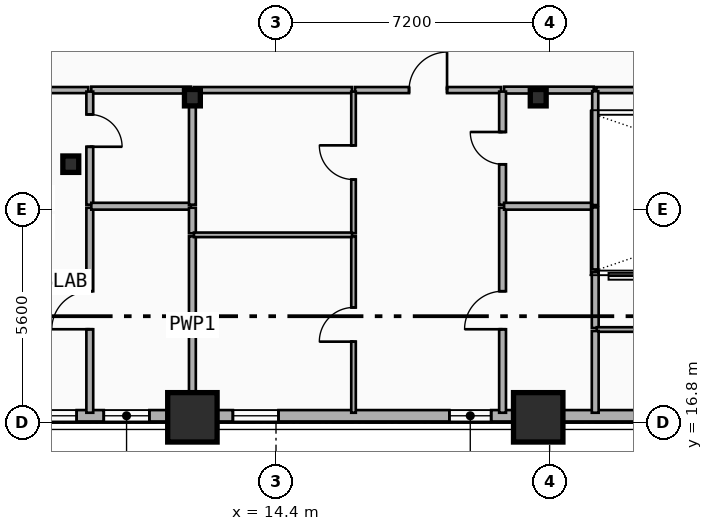
"""IFC4 building model, lengths in metres.
Left out: names, types, materials, properties, quantities, classifications, styles, units other than length and angle.
Written with IfcOpenShell. Run it as: python <this file> out.ifc"""

import sys

from ifc_helpers import new_model, si_unit, direction, frame, frame_2d, origin, origin_2d, place, context, subcontext, project, spatial, rectangle, i_section, extrude, element, fill, save


model = new_model("IFC4")
c1 = context("Model", 3, precision=1e-05, world=origin(), true_north=direction((0.0, 1.0)))
c2 = subcontext(c1, "Body", "Model", "MODEL_VIEW")
j1 = project(units=[si_unit("LENGTHUNIT", "METRE"), si_unit("PLANEANGLEUNIT", "RADIAN")], contexts=[c1])
p1 = place(None, origin())
s1 = spatial("IfcSite", under=j1, at=p1, CompositionType="ELEMENT")
p2 = place(p1, origin())
s2 = spatial("IfcBuilding", under=s1, at=p2, CompositionType="ELEMENT")
p3 = place(p2, frame((0.0, 0.0, 101.3)))
s3 = spatial("IfcBuildingStorey", under=s2, at=p3, CompositionType="ELEMENT", Elevation=101.3)
for number, where, z_axis, x_axis in (
    (1, (12.2, 25.35, 0.0), (0.0, 0.0, 1.0), (1.0, 0.0, 0.0)),
    (2, (21.3, 25.35, 0.0), (0.0, 0.0, 1.0), (1.0, 0.0, 0.0)),
):
    element("IfcColumn", number, at=place(p3, frame(where, z_axis=z_axis, x_axis=x_axis)), inside=s3, PredefinedType="COLUMN", context=c2, shape_type="SweptSolid", body=[
        extrude(i_section(OverallWidth=0.418, OverallDepth=0.432, WebThickness=0.035, FlangeThickness=0.056, FilletRadius=0.015, at=origin_2d()), origin(), (0.0, 0.0, 1.0), 3.5),
    ])
for number, where, z_axis, x_axis in (
    (3, (12.2, 17.048, 0.0), (0.0, -0.09, 0.996), (1.0, 0.0, 0.0)),
    (4, (21.3, 17.048, 0.0), (0.0, -0.09, 0.996), (1.0, 0.0, 0.0)),
):
    element("IfcColumn", number, at=place(p3, frame(where, z_axis=z_axis, x_axis=x_axis)), inside=s3, PredefinedType="COLUMN", context=c2, shape_type="SweptSolid", body=[
        extrude(rectangle(XDim=1.3, YDim=1.3, at=origin_2d()), origin(), (0.0, 0.0, 1.0), 3.514),
    ])
p4 = place(p3, frame((9.0, 23.6, 0.0), z_axis=(0.0, 0.0, 1.0), x_axis=(1.0, 0.0, 0.0)))
e5 = element("IfcColumn", 5, at=p4, inside=s3, PredefinedType="COLUMN", context=c2, shape_type="SweptSolid", body=[
    extrude(i_section(OverallWidth=0.418, OverallDepth=0.432, WebThickness=0.035, FlangeThickness=0.056, FilletRadius=0.015, at=origin_2d()), origin(), (0.0, 0.0, 1.0), 3.5),
])
p5 = place(p3, frame((53.4, 16.98, 0.0), z_axis=(0.0, 0.0, 1.0), x_axis=(-1.0, 0.0, 0.0)))
e6 = element("IfcWall", 6, at=p5, inside=s3, PredefinedType="SOLIDWALL", context=c2, shape_type="SweptSolid", body=[
    extrude(rectangle(XDim=49.2, YDim=0.3, at=frame_2d((24.6, 0.0))), origin(), (0.0, 0.0, 1.0), 2.86),
])
p6 = place(p5, frame((44.246, 0.0, 0.48)))
e7 = element("IfcOpeningElement", 7, at=p6, cuts=e6, PredefinedType="OPENING", context=c2, shape_type="SweptSolid", body=[
    extrude(rectangle(XDim=1.6, YDim=1.95, at=frame_2d((0.8, 0.975))), frame((0.0, 0.16, 0.0), z_axis=(0.0, -1.0, 0.0), x_axis=(1.0, 0.0, 0.0)), (0.0, 0.0, 1.0), 0.32),
])
p7 = place(p5, frame((42.333, 0.0, 0.68)))
e8 = element("IfcOpeningElement", 8, at=p7, cuts=e6, PredefinedType="OPENING", context=c2, shape_type="SweptSolid", body=[
    extrude(rectangle(XDim=1.2, YDim=1.5, at=frame_2d((0.6, 0.75))), frame((0.0, 0.16, 0.0), z_axis=(0.0, -1.0, 0.0), x_axis=(1.0, 0.0, 0.0)), (0.0, 0.0, 1.0), 0.32),
])
p8 = place(p5, frame((33.338, 0.0, 1.48)))
e9 = element("IfcOpeningElement", 9, at=p8, cuts=e6, PredefinedType="OPENING", context=c2, shape_type="SweptSolid", body=[
    extrude(rectangle(XDim=1.1, YDim=1.05, at=frame_2d((0.55, 0.525))), frame((0.0, 0.16, 0.0), z_axis=(0.0, -1.0, 0.0), x_axis=(1.0, 0.0, 0.0)), (0.0, 0.0, 1.0), 0.32),
])
p9 = place(p5, frame((38.935, 0.0, 0.48)))
e10 = element("IfcOpeningElement", 10, at=p9, cuts=e6, PredefinedType="OPENING", context=c2, shape_type="SweptSolid", body=[
    extrude(rectangle(XDim=1.2, YDim=1.5, at=frame_2d((0.6, 0.75))), frame((0.0, 0.16, 0.0), z_axis=(0.0, -1.0, 0.0), x_axis=(1.0, 0.0, 0.0)), (0.0, 0.0, 1.0), 0.32),
])
p10 = place(p5, frame((20.025, 0.0, 0.73)))
e11 = element("IfcOpeningElement", 11, at=p10, cuts=e6, PredefinedType="OPENING", context=c2, shape_type="SweptSolid", body=[
    extrude(rectangle(XDim=1.6, YDim=1.95, at=frame_2d((0.8, 0.975))), frame((0.0, 0.16, 0.0), z_axis=(0.0, -1.0, 0.0), x_axis=(1.0, 0.0, 0.0)), (0.0, 0.0, 1.0), 0.32),
])
p11 = place(p5, frame((13.65, 0.0, 0.52)))
e12 = element("IfcOpeningElement", 12, at=p11, cuts=e6, PredefinedType="OPENING", context=c2, shape_type="SweptSolid", body=[
    extrude(rectangle(XDim=1.1, YDim=1.05, at=frame_2d((0.55, 0.525))), frame((0.0, 0.16, 0.0), z_axis=(0.0, -1.0, 0.0), x_axis=(1.0, 0.0, 0.0)), (0.0, 0.0, 1.0), 0.32),
])
p12 = place(p5, frame((9.701, 0.0, 1.48)))
e13 = element("IfcOpeningElement", 13, at=p12, cuts=e6, PredefinedType="OPENING", context=c2, shape_type="SweptSolid", body=[
    extrude(rectangle(XDim=1.1, YDim=1.05, at=frame_2d((0.55, 0.525))), frame((0.0, 0.16, 0.0), z_axis=(0.0, -1.0, 0.0), x_axis=(1.0, 0.0, 0.0)), (0.0, 0.0, 1.0), 0.32),
])
p13 = place(p5, frame((3.354, 0.0, 0.48)))
e14 = element("IfcOpeningElement", 14, at=p13, cuts=e6, PredefinedType="OPENING", context=c2, shape_type="SweptSolid", body=[
    extrude(rectangle(XDim=1.6, YDim=1.95, at=frame_2d((0.8, 0.975))), frame((0.0, 0.16, 0.0), z_axis=(0.0, -1.0, 0.0), x_axis=(1.0, 0.0, 0.0)), (0.0, 0.0, 1.0), 0.32),
])
p14 = place(p5, frame((5.667, 0.0, 0.68)))
e15 = element("IfcOpeningElement", 15, at=p14, cuts=e6, PredefinedType="OPENING", context=c2, shape_type="SweptSolid", body=[
    extrude(rectangle(XDim=1.2, YDim=1.5, at=frame_2d((0.6, 0.75))), frame((0.0, 0.16, 0.0), z_axis=(0.0, -1.0, 0.0), x_axis=(1.0, 0.0, 0.0)), (0.0, 0.0, 1.0), 0.32),
])
p15 = place(p3, frame((5.122, 25.55, 0.0), z_axis=(0.0, 0.0, 1.0), x_axis=(1.0, 0.0, 0.0)))
e16 = element("IfcWall", 16, at=p15, inside=s3, PredefinedType="PARTITIONING", context=c2, shape_type="SweptSolid", body=[
    extrude(rectangle(XDim=4.338, YDim=0.16, at=frame_2d((2.169, 0.0))), origin(), (0.0, 0.0, 1.0), 2.57),
])
p16 = place(p15, frame((1.669, 0.0, 0.0)))
e17 = element("IfcOpeningElement", 17, at=p16, cuts=e16, PredefinedType="OPENING", context=c2, shape_type="SweptSolid", body=[
    extrude(rectangle(XDim=1.0, YDim=2.15, at=frame_2d((0.5, 1.075))), frame((0.0, 0.09, 0.0), z_axis=(0.0, -1.0, 0.0), x_axis=(1.0, 0.0, 0.0)), (0.0, 0.0, 1.0), 0.18),
])
p17 = place(p3, frame((9.54, 25.55, 0.0), z_axis=(0.0, 0.0, 1.0), x_axis=(1.0, 0.0, 0.0)))
e18 = element("IfcWall", 18, at=p17, inside=s3, PredefinedType="PLUMBINGWALL", context=c2, shape_type="SweptSolid", body=[
    extrude(rectangle(XDim=2.62, YDim=0.18, at=frame_2d((1.31, 0.0))), origin(), (0.0, 0.0, 1.0), 2.31),
])
p18 = place(p3, frame((16.48, 25.55, 0.0), z_axis=(0.0, 0.0, 1.0), x_axis=(1.0, 0.0, 0.0)))
e19 = element("IfcWall", 19, at=p18, inside=s3, PredefinedType="PARTITIONING", context=c2, shape_type="SweptSolid", body=[
    extrude(rectangle(XDim=3.842, YDim=0.16, at=frame_2d((1.921, 0.0))), origin(), (0.0, 0.0, 1.0), 3.24),
])
p19 = place(p18, frame((1.421, 0.0, 0.0)))
e20 = element("IfcOpeningElement", 20, at=p19, cuts=e19, PredefinedType="OPENING", context=c2, shape_type="SweptSolid", body=[
    extrude(rectangle(XDim=1.0, YDim=2.15, at=frame_2d((0.5, 1.075))), frame((0.0, 0.09, 0.0), z_axis=(0.0, -1.0, 0.0), x_axis=(1.0, 0.0, 0.0)), (0.0, 0.0, 1.0), 0.18),
])
p20 = place(p3, frame((20.402, 25.55, 0.0), z_axis=(0.0, 0.0, 1.0), x_axis=(1.0, 0.0, 0.0)))
e21 = element("IfcWall", 21, at=p20, inside=s3, PredefinedType="PLUMBINGWALL", context=c2, shape_type="SweptSolid", body=[
    extrude(rectangle(XDim=2.358, YDim=0.18, at=frame_2d((1.179, 0.0))), origin(), (0.0, 0.0, 1.0), 2.31),
])
p21 = place(p3, frame((12.24, 25.55, 0.0), z_axis=(0.0, 0.0, 1.0), x_axis=(1.0, 0.0, 0.0)))
e22 = element("IfcWall", 22, at=p21, inside=s3, PredefinedType="PARTITIONING", context=c2, shape_type="SweptSolid", body=[
    extrude(rectangle(XDim=4.16, YDim=0.16, at=frame_2d((2.08, 0.0))), origin(), (0.0, 0.0, 1.0), 2.31),
])
p22 = place(p3, frame((22.8, 19.29, 0.0), z_axis=(0.0, 0.0, 1.0), x_axis=(0.0, 1.0, 0.0)))
e23 = element("IfcWall", 23, at=p22, inside=s3, PredefinedType="PLUMBINGWALL", context=c2, shape_type="SweptSolid", body=[
    extrude(rectangle(XDim=1.47, YDim=0.18, at=frame_2d((0.735, 0.0))), origin(), (0.0, 0.0, 1.0), 2.68),
])
p23 = place(p3, frame((22.84, 19.25, 0.0), z_axis=(0.0, 0.0, 1.0), x_axis=(1.0, 0.0, 0.0)))
e24 = element("IfcWall", 24, at=p23, inside=s3, PredefinedType="PARTITIONING", context=c2, shape_type="SweptSolid", body=[
    extrude(rectangle(XDim=13.47, YDim=0.12, at=frame_2d((6.735, 0.0))), origin(), (0.0, 0.0, 1.0), 2.31),
])
p24 = place(p23, frame((6.285, 0.0, 0.0)))
e25 = element("IfcOpeningElement", 25, at=p24, cuts=e24, PredefinedType="OPENING", context=c2, shape_type="SweptSolid", body=[
    extrude(rectangle(XDim=0.9, YDim=2.1, at=frame_2d((0.45, 1.05))), frame((0.0, 0.07, 0.0), z_axis=(0.0, -1.0, 0.0), x_axis=(1.0, 0.0, 0.0)), (0.0, 0.0, 1.0), 0.14),
])
p25 = place(p3, frame((9.5, 17.06, 0.0), z_axis=(0.0, 0.0, 1.0), x_axis=(0.0, 1.0, 0.0)))
e26 = element("IfcWall", 26, at=p25, inside=s3, PredefinedType="PLUMBINGWALL", context=c2, shape_type="SweptSolid", body=[
    extrude(rectangle(XDim=5.394, YDim=0.18, at=frame_2d((2.697, 0.0))), origin(), (0.0, 0.0, 1.0), 2.72),
])
p26 = place(p25, frame((2.197, 0.0, 0.0)))
e27 = element("IfcOpeningElement", 27, at=p26, cuts=e26, PredefinedType="OPENING", context=c2, shape_type="SweptSolid", body=[
    extrude(rectangle(XDim=1.0, YDim=2.15, at=frame_2d((0.5, 1.075))), frame((0.0, 0.1, 0.0), z_axis=(0.0, -1.0, 0.0), x_axis=(1.0, 0.0, 0.0)), (0.0, 0.0, 1.0), 0.2),
])
p27 = place(p3, frame((9.5, 25.51, 0.0), z_axis=(0.0, 0.0, 1.0), x_axis=(0.0, -1.0, 0.0)))
e28 = element("IfcWall", 28, at=p27, inside=s3, PredefinedType="PLUMBINGWALL", context=c2, shape_type="SweptSolid", body=[
    extrude(rectangle(XDim=2.976, YDim=0.18, at=frame_2d((1.488, 0.0))), origin(), (0.0, 0.0, 1.0), 2.72),
])
p28 = place(p27, frame((0.602, 0.0, 0.0)))
e29 = element("IfcOpeningElement", 29, at=p28, cuts=e28, PredefinedType="OPENING", context=c2, shape_type="SweptSolid", body=[
    extrude(rectangle(XDim=0.85, YDim=2.1, at=frame_2d((0.425, 1.05))), frame((0.0, 0.1, 0.0), z_axis=(0.0, -1.0, 0.0), x_axis=(1.0, 0.0, 0.0)), (0.0, 0.0, 1.0), 0.2),
])
p29 = place(p3, frame((9.54, 22.494, 0.0), z_axis=(0.0, 0.0, 1.0), x_axis=(1.0, 0.0, 0.0)))
e30 = element("IfcWall", 30, at=p29, inside=s3, PredefinedType="PLUMBINGWALL", context=c2, shape_type="SweptSolid", body=[
    extrude(rectangle(XDim=2.62, YDim=0.18, at=frame_2d((1.31, 0.0))), origin(), (0.0, 0.0, 1.0), 2.31),
])
p30 = place(p3, frame((12.2, 17.06, 0.0), z_axis=(0.0, 0.0, 1.0), x_axis=(0.0, 1.0, 0.0)))
e31 = element("IfcWall", 31, at=p30, inside=s3, PredefinedType="PLUMBINGWALL", context=c2, shape_type="SweptSolid", body=[
    extrude(rectangle(XDim=4.641, YDim=0.18, at=frame_2d((2.32, 0.0))), origin(), (0.0, 0.0, 1.0), 2.31),
])
p31 = place(p3, frame((12.2, 21.781, 0.0), z_axis=(0.0, 0.0, 1.0), x_axis=(0.0, 1.0, 0.0)))
e32 = element("IfcWall", 32, at=p31, inside=s3, PredefinedType="PLUMBINGWALL", context=c2, shape_type="SweptSolid", body=[
    extrude(rectangle(XDim=0.673, YDim=0.18, at=frame_2d((0.336, 0.0))), origin(), (0.0, 0.0, 1.0), 2.31),
])
p32 = place(p3, frame((12.2, 22.534, 0.0), z_axis=(0.0, 0.0, 1.0), x_axis=(0.0, 1.0, 0.0)))
e33 = element("IfcWall", 33, at=p32, inside=s3, PredefinedType="PLUMBINGWALL", context=c2, shape_type="SweptSolid", body=[
    extrude(rectangle(XDim=2.976, YDim=0.18, at=frame_2d((1.488, 0.0))), origin(), (0.0, 0.0, 1.0), 2.31),
])
p33 = place(p3, frame((20.362, 17.06, 0.0), z_axis=(0.0, 0.0, 1.0), x_axis=(0.0, 1.0, 0.0)))
e34 = element("IfcWall", 34, at=p33, inside=s3, PredefinedType="PLUMBINGWALL", context=c2, shape_type="SweptSolid", body=[
    extrude(rectangle(XDim=5.394, YDim=0.18, at=frame_2d((2.697, 0.0))), origin(), (0.0, 0.0, 1.0), 2.73),
])
p34 = place(p33, frame((2.197, 0.0, 0.0)))
e35 = element("IfcOpeningElement", 35, at=p34, cuts=e34, PredefinedType="OPENING", context=c2, shape_type="SweptSolid", body=[
    extrude(rectangle(XDim=1.0, YDim=2.15, at=frame_2d((0.5, 1.075))), frame((0.0, 0.1, 0.0), z_axis=(0.0, -1.0, 0.0), x_axis=(1.0, 0.0, 0.0)), (0.0, 0.0, 1.0), 0.2),
])
p35 = place(p3, frame((20.362, 22.534, 0.0), z_axis=(0.0, 0.0, 1.0), x_axis=(0.0, 1.0, 0.0)))
e36 = element("IfcWall", 36, at=p35, inside=s3, PredefinedType="PLUMBINGWALL", context=c2, shape_type="SweptSolid", body=[
    extrude(rectangle(XDim=2.976, YDim=0.18, at=frame_2d((1.488, 0.0))), origin(), (0.0, 0.0, 1.0), 2.87),
])
p36 = place(p35, frame((1.063, 0.0, 0.0)))
e37 = element("IfcOpeningElement", 37, at=p36, cuts=e36, PredefinedType="OPENING", context=c2, shape_type="SweptSolid", body=[
    extrude(rectangle(XDim=0.85, YDim=2.1, at=frame_2d((0.425, 1.05))), frame((0.0, 0.1, 0.0), z_axis=(0.0, -1.0, 0.0), x_axis=(1.0, 0.0, 0.0)), (0.0, 0.0, 1.0), 0.2),
])
p37 = place(p3, frame((16.44, 17.06, 0.0), z_axis=(0.0, 0.0, 1.0), x_axis=(0.0, 1.0, 0.0)))
e38 = element("IfcWall", 38, at=p37, inside=s3, PredefinedType="PARTITIONING", context=c2, shape_type="SweptSolid", body=[
    extrude(rectangle(XDim=4.641, YDim=0.12, at=frame_2d((2.32, 0.0))), origin(), (0.0, 0.0, 1.0), 2.73),
])
p38 = place(p37, frame((1.871, 0.0, 0.0)))
e39 = element("IfcOpeningElement", 39, at=p38, cuts=e38, PredefinedType="OPENING", context=c2, shape_type="SweptSolid", body=[
    extrude(rectangle(XDim=0.9, YDim=2.1, at=frame_2d((0.45, 1.05))), frame((0.0, 0.07, 0.0), z_axis=(0.0, -1.0, 0.0), x_axis=(1.0, 0.0, 0.0)), (0.0, 0.0, 1.0), 0.14),
])
p39 = place(p3, frame((16.44, 21.781, 0.0), z_axis=(0.0, 0.0, 1.0), x_axis=(0.0, 1.0, 0.0)))
e40 = element("IfcWall", 40, at=p39, inside=s3, PredefinedType="PARTITIONING", context=c2, shape_type="SweptSolid", body=[
    extrude(rectangle(XDim=3.729, YDim=0.12, at=frame_2d((1.865, 0.0))), origin(), (0.0, 0.0, 1.0), 2.87),
])
p40 = place(p39, frame((1.415, 0.0, 0.0)))
e41 = element("IfcOpeningElement", 41, at=p40, cuts=e40, PredefinedType="OPENING", context=c2, shape_type="SweptSolid", body=[
    extrude(rectangle(XDim=0.9, YDim=2.1, at=frame_2d((0.45, 1.05))), frame((0.0, 0.07, 0.0), z_axis=(0.0, -1.0, 0.0), x_axis=(1.0, 0.0, 0.0)), (0.0, 0.0, 1.0), 0.14),
])
p41 = place(p3, frame((20.402, 22.494, 0.0), z_axis=(0.0, 0.0, 1.0), x_axis=(1.0, 0.0, 0.0)))
e42 = element("IfcWall", 42, at=p41, inside=s3, PredefinedType="PLUMBINGWALL", context=c2, shape_type="SweptSolid", body=[
    extrude(rectangle(XDim=2.358, YDim=0.18, at=frame_2d((1.179, 0.0))), origin(), (0.0, 0.0, 1.0), 2.31),
])
p42 = place(p3, frame((22.8, 17.06, 0.0), z_axis=(0.0, 0.0, 1.0), x_axis=(0.0, 1.0, 0.0)))
e43 = element("IfcWall", 43, at=p42, inside=s3, PredefinedType="PLUMBINGWALL", context=c2, shape_type="SweptSolid", body=[
    extrude(rectangle(XDim=2.15, YDim=0.18, at=frame_2d((1.075, 0.0))), origin(), (0.0, 0.0, 1.0), 2.86),
])
p43 = place(p3, frame((12.24, 21.741, 0.0), z_axis=(0.0, 0.0, 1.0), x_axis=(1.0, 0.0, 0.0)))
e44 = element("IfcWall", 44, at=p43, inside=s3, PredefinedType="PARTITIONING", context=c2, shape_type="SweptSolid", body=[
    extrude(rectangle(XDim=4.16, YDim=0.12, at=frame_2d((2.08, 0.0))), origin(), (0.0, 0.0, 1.0), 2.31),
])
p44 = place(p3, frame((22.83, 25.55, 0.0), z_axis=(0.0, 0.0, 1.0), x_axis=(1.0, 0.0, 0.0)))
e45 = element("IfcWall", 45, at=p44, inside=s3, PredefinedType="PARTITIONING", context=c2, shape_type="SweptSolid", body=[
    extrude(rectangle(XDim=13.49, YDim=0.16, at=frame_2d((6.745, 0.0))), origin(), (0.0, 0.0, 1.0), 2.31),
])
p45 = place(p3, frame((22.8, 20.83, 0.0), z_axis=(0.0, 0.0, 1.0), x_axis=(0.0, 1.0, 0.0)))
e46 = element("IfcWall", 46, at=p45, inside=s3, PredefinedType="PARTITIONING", context=c2, shape_type="SweptSolid", body=[
    extrude(rectangle(XDim=1.634, YDim=0.16, at=frame_2d((0.817, 0.0))), origin(), (0.0, 0.0, 1.0), 2.68),
])
p46 = place(p3, frame((22.8, 22.524, 0.0), z_axis=(0.0, 0.0, 1.0), x_axis=(0.0, 1.0, 0.0)))
e47 = element("IfcWall", 47, at=p46, inside=s3, PredefinedType="PARTITIONING", context=c2, shape_type="SweptSolid", body=[
    extrude(rectangle(XDim=2.996, YDim=0.16, at=frame_2d((1.498, 0.0))), origin(), (0.0, 0.0, 1.0), 3.24),
])
p47 = place(p6, origin())
e48 = element("IfcWindow", 48, at=p47, inside=s3, PartitioningType="SINGLE_PANEL", PredefinedType="WINDOW", context=c2, shape_type="SweptSolid", body=[
    extrude(rectangle(XDim=1.6, YDim=1.95, at=frame_2d((0.8, 0.975))), frame((0.0, 0.03, 0.0), z_axis=(0.0, -1.0, 0.0), x_axis=(1.0, 0.0, 0.0)), (0.0, 0.0, 1.0), 0.06),
])
fill(e7, e48)
p48 = place(p7, origin())
e49 = element("IfcWindow", 49, at=p48, inside=s3, PartitioningType="SINGLE_PANEL", PredefinedType="WINDOW", context=c2, shape_type="SweptSolid", body=[
    extrude(rectangle(XDim=1.2, YDim=1.5, at=frame_2d((0.6, 0.75))), frame((0.0, 0.03, 0.0), z_axis=(0.0, -1.0, 0.0), x_axis=(1.0, 0.0, 0.0)), (0.0, 0.0, 1.0), 0.06),
])
fill(e8, e49)
p49 = place(p8, origin())
e50 = element("IfcWindow", 50, at=p49, inside=s3, PartitioningType="SINGLE_PANEL", PredefinedType="WINDOW", context=c2, shape_type="SweptSolid", body=[
    extrude(rectangle(XDim=1.1, YDim=1.05, at=frame_2d((0.55, 0.525))), frame((0.0, 0.03, 0.0), z_axis=(0.0, -1.0, 0.0), x_axis=(1.0, 0.0, 0.0)), (0.0, 0.0, 1.0), 0.06),
])
fill(e9, e50)
p50 = place(p9, origin())
e51 = element("IfcWindow", 51, at=p50, inside=s3, PartitioningType="SINGLE_PANEL", PredefinedType="WINDOW", context=c2, shape_type="SweptSolid", body=[
    extrude(rectangle(XDim=1.2, YDim=1.5, at=frame_2d((0.6, 0.75))), frame((0.0, 0.03, 0.0), z_axis=(0.0, -1.0, 0.0), x_axis=(1.0, 0.0, 0.0)), (0.0, 0.0, 1.0), 0.06),
])
fill(e10, e51)
p51 = place(p19, origin())
e52 = element("IfcDoor", 52, at=p51, inside=s3, OperationType="SINGLE_SWING_RIGHT", PredefinedType="DOOR", context=c2, shape_type="SweptSolid", body=[
    extrude(rectangle(XDim=1.0, YDim=2.15, at=frame_2d((0.5, 1.075))), frame((0.0, 0.025, 0.0), z_axis=(0.0, -1.0, 0.0), x_axis=(1.0, 0.0, 0.0)), (0.0, 0.0, 1.0), 0.05),
])
fill(e20, e52)
p52 = place(p26, origin())
e53 = element("IfcDoor", 53, at=p52, inside=s3, OperationType="SINGLE_SWING_LEFT", PredefinedType="DOOR", context=c2, shape_type="SweptSolid", body=[
    extrude(rectangle(XDim=1.0, YDim=2.15, at=frame_2d((0.5, 1.075))), frame((0.0, 0.025, 0.0), z_axis=(0.0, -1.0, 0.0), x_axis=(1.0, 0.0, 0.0)), (0.0, 0.0, 1.0), 0.05),
])
fill(e27, e53)
p53 = place(p28, origin())
e54 = element("IfcDoor", 54, at=p53, inside=s3, OperationType="SINGLE_SWING_RIGHT", PredefinedType="DOOR", context=c2, shape_type="SweptSolid", body=[
    extrude(rectangle(XDim=0.85, YDim=2.1, at=frame_2d((0.425, 1.05))), frame((0.0, 0.025, 0.0), z_axis=(0.0, -1.0, 0.0), x_axis=(1.0, 0.0, 0.0)), (0.0, 0.0, 1.0), 0.05),
])
fill(e29, e54)
p54 = place(p34, origin())
e55 = element("IfcDoor", 55, at=p54, inside=s3, OperationType="SINGLE_SWING_LEFT", PredefinedType="DOOR", context=c2, shape_type="SweptSolid", body=[
    extrude(rectangle(XDim=1.0, YDim=2.15, at=frame_2d((0.5, 1.075))), frame((0.0, 0.025, 0.0), z_axis=(0.0, -1.0, 0.0), x_axis=(1.0, 0.0, 0.0)), (0.0, 0.0, 1.0), 0.05),
])
fill(e35, e55)
p55 = place(p36, origin())
e56 = element("IfcDoor", 56, at=p55, inside=s3, OperationType="SINGLE_SWING_RIGHT", PredefinedType="DOOR", context=c2, shape_type="SweptSolid", body=[
    extrude(rectangle(XDim=0.85, YDim=2.1, at=frame_2d((0.425, 1.05))), frame((0.0, 0.025, 0.0), z_axis=(0.0, -1.0, 0.0), x_axis=(1.0, 0.0, 0.0)), (0.0, 0.0, 1.0), 0.05),
])
fill(e37, e56)
p56 = place(p38, origin())
e57 = element("IfcDoor", 57, at=p56, inside=s3, OperationType="SINGLE_SWING_LEFT", PredefinedType="DOOR", context=c2, shape_type="SweptSolid", body=[
    extrude(rectangle(XDim=0.9, YDim=2.1, at=frame_2d((0.45, 1.05))), frame((0.0, 0.025, 0.0), z_axis=(0.0, -1.0, 0.0), x_axis=(1.0, 0.0, 0.0)), (0.0, 0.0, 1.0), 0.05),
])
fill(e39, e57)
p57 = place(p40, origin())
e58 = element("IfcDoor", 58, at=p57, inside=s3, OperationType="SINGLE_SWING_RIGHT", PredefinedType="DOOR", context=c2, shape_type="SweptSolid", body=[
    extrude(rectangle(XDim=0.9, YDim=2.1, at=frame_2d((0.45, 1.05))), frame((0.0, 0.025, 0.0), z_axis=(0.0, -1.0, 0.0), x_axis=(1.0, 0.0, 0.0)), (0.0, 0.0, 1.0), 0.05),
])
fill(e41, e58)
save(model, sys.argv[1])
